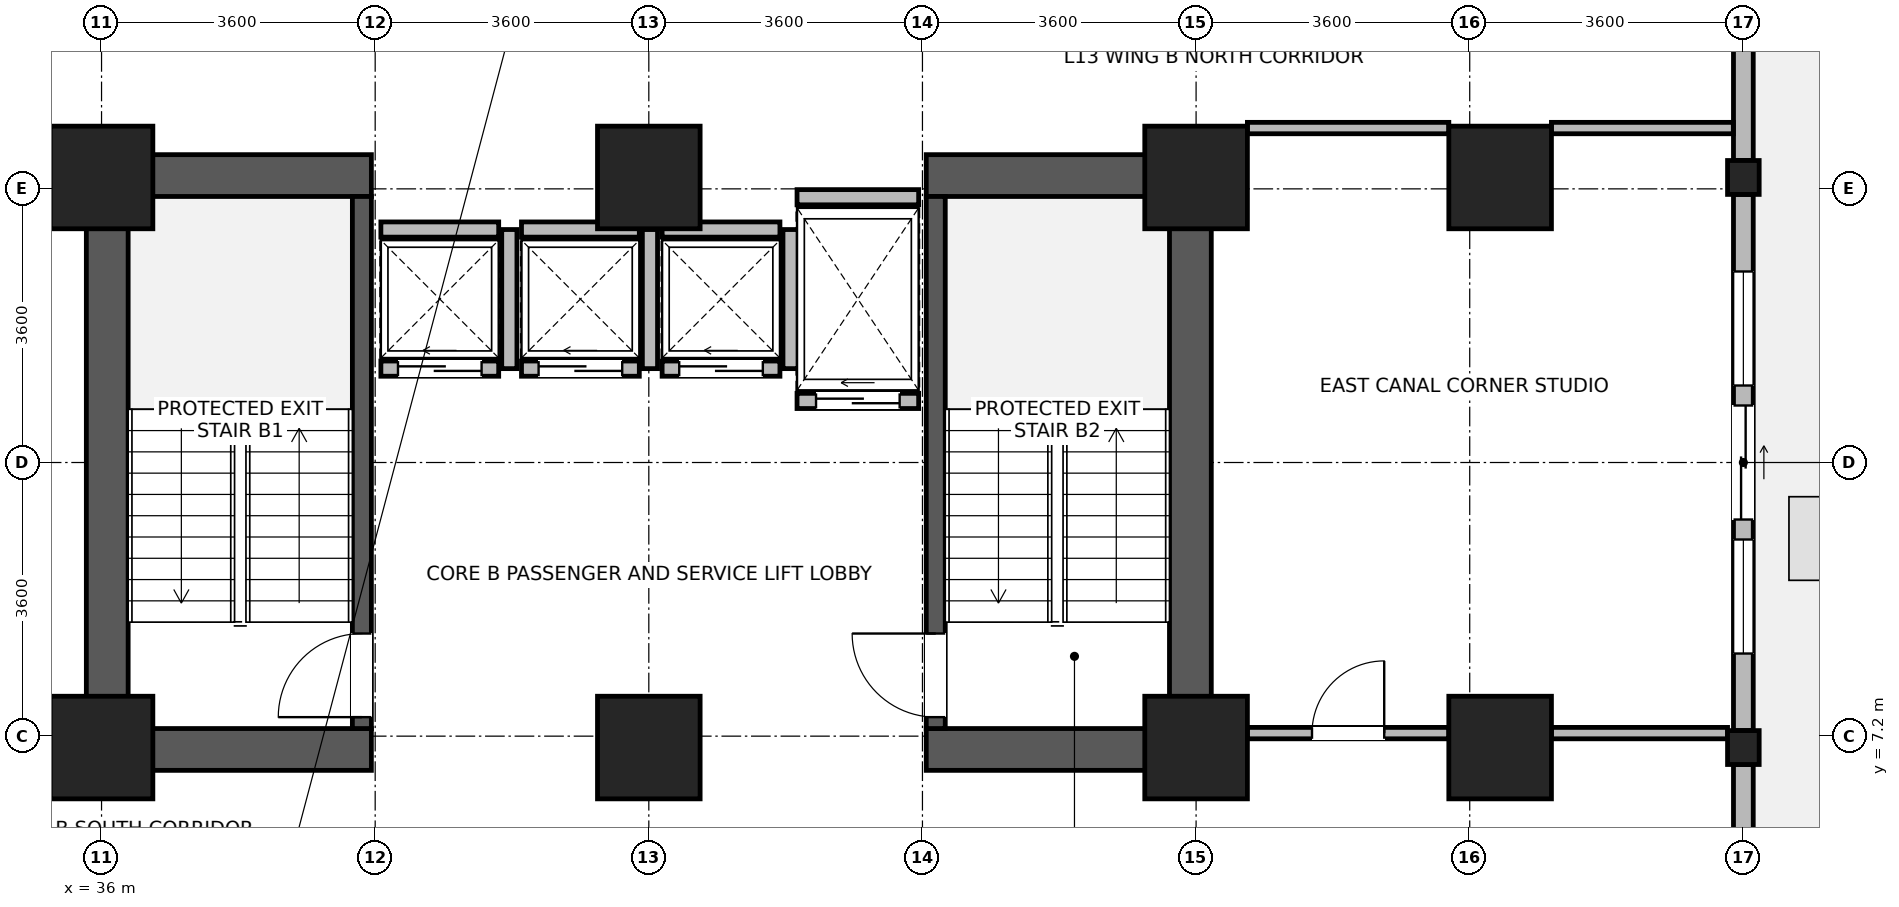
"""IFC4 building model, lengths in metres.
Left out: names, types, materials, properties, quantities, classifications, styles, units other than length and angle.
Written with IfcOpenShell. Run it as: python <this file> out.ifc"""

import sys

from ifc_helpers import new_model, si_unit, direction, frame, frame_2d, origin, origin_2d, place, context, subcontext, project, spatial, rectangle, i_section, extrude, source, transform, mapped, element, fill, save


model = new_model("IFC4")
c1 = context("Model", 3, precision=1e-05, world=origin(), true_north=direction((0.0, 1.0)))
c2 = subcontext(c1, "Body", "Model", "MODEL_VIEW")
j1 = project(units=[si_unit("LENGTHUNIT", "METRE"), si_unit("PLANEANGLEUNIT", "RADIAN")], contexts=[c1])
p1 = place(None, origin())
s1 = spatial("IfcSite", under=j1, at=p1, CompositionType="ELEMENT")
p2 = place(p1, origin())
s2 = spatial("IfcBuilding", under=s1, at=p2, CompositionType="ELEMENT")
p3 = place(p2, frame((0.0, 0.0, 54.9)))
s3 = spatial("IfcBuildingStorey", under=s2, at=p3, CompositionType="ELEMENT", Elevation=54.9)
for number, where, z_axis, x_axis in (
    (1, (36.075, 6.75, 0.0), (0.0, 0.0, 1.0), (0.0, 1.0, 0.0)),
    (2, (50.325, 6.75, 0.0), (0.0, 0.0, 1.0), (0.0, 1.0, 0.0)),
):
    element("IfcWall", number, at=place(p3, frame(where, z_axis=z_axis, x_axis=x_axis)), inside=s3, PredefinedType="SHEAR", context=c2, shape_type="SweptSolid", body=[
        extrude(rectangle(XDim=8.1, YDim=0.55, at=frame_2d((4.05, 0.0))), origin(), (0.0, 0.0, 1.0), 3.45),
    ])
for number, where, z_axis, x_axis in (
    (3, (36.35, 7.025, 0.0), (0.0, 0.0, 1.0), (1.0, 0.0, 0.0)),
    (4, (46.85, 7.025, 0.0), (0.0, 0.0, 1.0), (1.0, 0.0, 0.0)),
    (5, (36.35, 14.575, 0.0), (0.0, 0.0, 1.0), (1.0, 0.0, 0.0)),
    (6, (46.85, 14.575, 0.0), (0.0, 0.0, 1.0), (1.0, 0.0, 0.0)),
):
    element("IfcWall", number, at=place(p3, frame(where, z_axis=z_axis, x_axis=x_axis)), inside=s3, PredefinedType="SHEAR", context=c2, shape_type="SweptSolid", body=[
        extrude(rectangle(XDim=3.2, YDim=0.55, at=frame_2d((1.6, 0.0))), origin(), (0.0, 0.0, 1.0), 3.45),
    ])
p4 = place(p3, frame((39.425, 7.3, 0.0), z_axis=(0.0, 0.0, 1.0), x_axis=(0.0, 1.0, 0.0)))
e7 = element("IfcWall", 7, at=p4, inside=s3, PredefinedType="SHEAR", context=c2, shape_type="SweptSolid", body=[
    extrude(rectangle(XDim=7.0, YDim=0.25, at=frame_2d((3.5, 0.0))), origin(), (0.0, 0.0, 1.0), 3.45),
])
p5 = place(p4, frame((0.15, 0.0, 0.0)))
e8 = element("IfcOpeningElement", 8, at=p5, cuts=e7, PredefinedType="OPENING", context=c2, shape_type="SweptSolid", body=[
    extrude(rectangle(XDim=1.1, YDim=2.08, at=frame_2d((0.55, 1.04))), frame((0.0, 0.135, 0.0), z_axis=(0.0, -1.0, 0.0), x_axis=(1.0, 0.0, 0.0)), (0.0, 0.0, 1.0), 0.27),
])
p6 = place(p3, frame((46.975, 7.3, 0.0), z_axis=(0.0, 0.0, 1.0), x_axis=(0.0, 1.0, 0.0)))
e9 = element("IfcWall", 9, at=p6, inside=s3, PredefinedType="SHEAR", context=c2, shape_type="SweptSolid", body=[
    extrude(rectangle(XDim=7.0, YDim=0.25, at=frame_2d((3.5, 0.0))), origin(), (0.0, 0.0, 1.0), 3.45),
])
p7 = place(p6, frame((0.15, 0.0, 0.0)))
e10 = element("IfcOpeningElement", 10, at=p7, cuts=e9, PredefinedType="OPENING", context=c2, shape_type="SweptSolid", body=[
    extrude(rectangle(XDim=1.1, YDim=2.08, at=frame_2d((0.55, 1.04))), frame((0.0, 0.135, 0.0), z_axis=(0.0, -1.0, 0.0), x_axis=(1.0, 0.0, 0.0)), (0.0, 0.0, 1.0), 0.27),
])
m1 = source(origin(), c2, "Body", "SweptSolid", [
    extrude(rectangle(XDim=1.35, YDim=1.35, at=origin_2d()), origin(), (0.0, 0.0, 1.0), 3.7),
])
for number, where, z_axis, x_axis in (
    (11, (36.0, 7.05, 0.0), (0.0, 0.0, 1.0), (1.0, 0.0, 0.0)),
    (12, (36.0, 14.55, 0.0), (0.0, 0.0, 1.0), (1.0, 0.0, 0.0)),
    (13, (43.2, 7.05, 0.0), (0.0, 0.0, 1.0), (1.0, 0.0, 0.0)),
    (14, (43.2, 14.55, 0.0), (0.0, 0.0, 1.0), (1.0, 0.0, 0.0)),
    (15, (50.4, 7.05, 0.0), (0.0, 0.0, 1.0), (1.0, 0.0, 0.0)),
    (16, (50.4, 14.55, 0.0), (0.0, 0.0, 1.0), (1.0, 0.0, 0.0)),
    (17, (54.4, 7.05, 0.0), (0.0, 0.0, 1.0), (1.0, 0.0, 0.0)),
    (18, (54.4, 14.55, 0.0), (0.0, 0.0, 1.0), (1.0, 0.0, 0.0)),
):
    element("IfcColumn", number, at=place(p3, frame(where, z_axis=z_axis, x_axis=x_axis)), inside=s3, PredefinedType="COLUMN", context=c2, shape_type="MappedRepresentation", body=[
        mapped(m1, transform((0.0, 0.0, 0.0), x_axis=(1.0, 0.0, 0.0), y_axis=(0.0, 1.0, 0.0), z_axis=(0.0, 0.0, 1.0), scale=1.0)),
    ])
m2 = source(origin(), c2, "Body", "SweptSolid", [
    extrude(i_section(OverallWidth=0.416, OverallDepth=0.446, WebThickness=0.029, FlangeThickness=0.04, FilletRadius=0.015, at=origin_2d()), origin(), (0.0, 0.0, 1.0), 3.7),
])
for number, where, z_axis, x_axis in (
    (19, (57.6, 7.05, 0.0), (0.0, 0.0, 1.0), (1.0, 0.0, 0.0)),
    (20, (57.6, 14.55, 0.0), (0.0, 0.0, 1.0), (1.0, 0.0, 0.0)),
):
    element("IfcColumn", number, at=place(p3, frame(where, z_axis=z_axis, x_axis=x_axis)), inside=s3, PredefinedType="COLUMN", context=c2, shape_type="MappedRepresentation", body=[
        mapped(m2, transform((0.0, 0.0, 0.0), x_axis=(1.0, 0.0, 0.0), y_axis=(0.0, 1.0, 0.0), z_axis=(0.0, 0.0, 1.0), scale=1.0)),
    ])
p8 = place(p3, frame((57.6, 6.826, 0.0), z_axis=(0.0, 0.0, 1.0), x_axis=(0.0, -1.0, 0.0)))
e21 = element("IfcWall", 21, at=p8, inside=s3, PredefinedType="STANDARD", context=c2, shape_type="SweptSolid", body=[
    extrude(rectangle(XDim=2.156, YDim=0.26, at=frame_2d((1.078, 0.0))), origin(), (0.0, 0.0, 1.0), 3.43),
])
p9 = place(p3, frame((57.6, 14.326, 0.0), z_axis=(0.0, 0.0, 1.0), x_axis=(0.0, -1.0, 0.0)))
e22 = element("IfcWall", 22, at=p9, inside=s3, PredefinedType="STANDARD", context=c2, shape_type="SweptSolid", body=[
    extrude(rectangle(XDim=7.052, YDim=0.26, at=frame_2d((3.526, 0.0))), origin(), (0.0, 0.0, 1.0), 2.93),
])
p10 = place(p9, frame((2.776, 0.0, 0.0)))
e23 = element("IfcOpeningElement", 23, at=p10, cuts=e22, PredefinedType="OPENING", context=c2, shape_type="SweptSolid", body=[
    extrude(rectangle(XDim=1.5, YDim=2.15, at=frame_2d((0.75, 1.075))), frame((0.0, 0.14, 0.0), z_axis=(0.0, -1.0, 0.0), x_axis=(1.0, 0.0, 0.0)), (0.0, 0.0, 1.0), 0.28),
])
p11 = place(p9, frame((1.013, 0.0, 0.85)))
e24 = element("IfcOpeningElement", 24, at=p11, cuts=e22, PredefinedType="OPENING", context=c2, shape_type="SweptSolid", body=[
    extrude(rectangle(XDim=1.5, YDim=1.85, at=frame_2d((0.75, 0.925))), frame((0.0, 0.14, 0.0), z_axis=(0.0, -1.0, 0.0), x_axis=(1.0, 0.0, 0.0)), (0.0, 0.0, 1.0), 0.28),
])
p12 = place(p9, frame((4.539, 0.0, 0.85)))
e25 = element("IfcOpeningElement", 25, at=p12, cuts=e22, PredefinedType="OPENING", context=c2, shape_type="SweptSolid", body=[
    extrude(rectangle(XDim=1.5, YDim=1.85, at=frame_2d((0.75, 0.925))), frame((0.0, 0.14, 0.0), z_axis=(0.0, -1.0, 0.0), x_axis=(1.0, 0.0, 0.0)), (0.0, 0.0, 1.0), 0.28),
])
p13 = place(p3, frame((57.6, 21.376, 0.0), z_axis=(0.0, 0.0, 1.0), x_axis=(0.0, -1.0, 0.0)))
e26 = element("IfcWall", 26, at=p13, inside=s3, PredefinedType="STANDARD", context=c2, shape_type="SweptSolid", body=[
    extrude(rectangle(XDim=6.602, YDim=0.26, at=frame_2d((3.301, 0.0))), origin(), (0.0, 0.0, 1.0), 2.93),
])
p14 = place(p13, frame((0.9, 0.0, 0.85)))
e27 = element("IfcOpeningElement", 27, at=p14, cuts=e26, PredefinedType="OPENING", context=c2, shape_type="SweptSolid", body=[
    extrude(rectangle(XDim=1.5, YDim=1.85, at=frame_2d((0.75, 0.925))), frame((0.0, 0.14, 0.0), z_axis=(0.0, -1.0, 0.0), x_axis=(1.0, 0.0, 0.0)), (0.0, 0.0, 1.0), 0.28),
])
p15 = place(p13, frame((2.826, 0.0, 0.85)))
e28 = element("IfcOpeningElement", 28, at=p15, cuts=e26, PredefinedType="OPENING", context=c2, shape_type="SweptSolid", body=[
    extrude(rectangle(XDim=0.95, YDim=1.75, at=frame_2d((0.475, 0.875))), frame((0.0, 0.14, 0.0), z_axis=(0.0, -1.0, 0.0), x_axis=(1.0, 0.0, 0.0)), (0.0, 0.0, 1.0), 0.28),
])
p16 = place(p3, frame((39.675, 12.035, 0.0), z_axis=(0.0, 0.0, 1.0), x_axis=(1.0, 0.0, 0.0)))
e29 = element("IfcWall", 29, at=p16, inside=s3, PredefinedType="PARTITIONING", context=c2, shape_type="SweptSolid", body=[
    extrude(rectangle(XDim=1.55, YDim=0.2, at=frame_2d((0.775, 0.0))), origin(), (0.0, 0.0, 1.0), 3.43),
])
p17 = place(p16, frame((0.225, 0.0, 0.0)))
e30 = element("IfcOpeningElement", 30, at=p17, cuts=e29, PredefinedType="OPENING", context=c2, shape_type="SweptSolid", body=[
    extrude(rectangle(XDim=1.1, YDim=2.12, at=frame_2d((0.55, 1.06))), frame((0.0, 0.11, 0.0), z_axis=(0.0, -1.0, 0.0), x_axis=(1.0, 0.0, 0.0)), (0.0, 0.0, 1.0), 0.22),
])
p18 = place(p3, frame((39.675, 13.865, 0.0), z_axis=(0.0, 0.0, 1.0), x_axis=(1.0, 0.0, 0.0)))
e31 = element("IfcWall", 31, at=p18, inside=s3, PredefinedType="PARTITIONING", context=c2, shape_type="SweptSolid", body=[
    extrude(rectangle(XDim=1.55, YDim=0.2, at=frame_2d((0.775, 0.0))), origin(), (0.0, 0.0, 1.0), 3.43),
])
p19 = place(p3, frame((41.365, 12.035, 0.0), z_axis=(0.0, 0.0, 1.0), x_axis=(0.0, 1.0, 0.0)))
e32 = element("IfcWall", 32, at=p19, inside=s3, PredefinedType="PARTITIONING", context=c2, shape_type="SweptSolid", body=[
    extrude(rectangle(XDim=1.83, YDim=0.2, at=frame_2d((0.915, 0.0))), origin(), (0.0, 0.0, 1.0), 3.43),
])
p20 = place(p3, frame((41.525, 12.035, 0.0), z_axis=(0.0, 0.0, 1.0), x_axis=(1.0, 0.0, 0.0)))
e33 = element("IfcWall", 33, at=p20, inside=s3, PredefinedType="PARTITIONING", context=c2, shape_type="SweptSolid", body=[
    extrude(rectangle(XDim=1.55, YDim=0.2, at=frame_2d((0.775, 0.0))), origin(), (0.0, 0.0, 1.0), 3.43),
])
p21 = place(p20, frame((0.225, 0.0, 0.0)))
e34 = element("IfcOpeningElement", 34, at=p21, cuts=e33, PredefinedType="OPENING", context=c2, shape_type="SweptSolid", body=[
    extrude(rectangle(XDim=1.1, YDim=2.12, at=frame_2d((0.55, 1.06))), frame((0.0, 0.11, 0.0), z_axis=(0.0, -1.0, 0.0), x_axis=(1.0, 0.0, 0.0)), (0.0, 0.0, 1.0), 0.22),
])
p22 = place(p3, frame((41.525, 13.865, 0.0), z_axis=(0.0, 0.0, 1.0), x_axis=(1.0, 0.0, 0.0)))
e35 = element("IfcWall", 35, at=p22, inside=s3, PredefinedType="PARTITIONING", context=c2, shape_type="SweptSolid", body=[
    extrude(rectangle(XDim=1.55, YDim=0.2, at=frame_2d((0.775, 0.0))), origin(), (0.0, 0.0, 1.0), 3.43),
])
p23 = place(p3, frame((43.215, 12.035, 0.0), z_axis=(0.0, 0.0, 1.0), x_axis=(0.0, 1.0, 0.0)))
e36 = element("IfcWall", 36, at=p23, inside=s3, PredefinedType="PARTITIONING", context=c2, shape_type="SweptSolid", body=[
    extrude(rectangle(XDim=1.83, YDim=0.2, at=frame_2d((0.915, 0.0))), origin(), (0.0, 0.0, 1.0), 3.43),
])
p24 = place(p3, frame((43.375, 12.035, 0.0), z_axis=(0.0, 0.0, 1.0), x_axis=(1.0, 0.0, 0.0)))
e37 = element("IfcWall", 37, at=p24, inside=s3, PredefinedType="PARTITIONING", context=c2, shape_type="SweptSolid", body=[
    extrude(rectangle(XDim=1.55, YDim=0.2, at=frame_2d((0.775, 0.0))), origin(), (0.0, 0.0, 1.0), 3.43),
])
p25 = place(p24, frame((0.225, 0.0, 0.0)))
e38 = element("IfcOpeningElement", 38, at=p25, cuts=e37, PredefinedType="OPENING", context=c2, shape_type="SweptSolid", body=[
    extrude(rectangle(XDim=1.1, YDim=2.12, at=frame_2d((0.55, 1.06))), frame((0.0, 0.11, 0.0), z_axis=(0.0, -1.0, 0.0), x_axis=(1.0, 0.0, 0.0)), (0.0, 0.0, 1.0), 0.22),
])
p26 = place(p3, frame((43.375, 13.865, 0.0), z_axis=(0.0, 0.0, 1.0), x_axis=(1.0, 0.0, 0.0)))
e39 = element("IfcWall", 39, at=p26, inside=s3, PredefinedType="PARTITIONING", context=c2, shape_type="SweptSolid", body=[
    extrude(rectangle(XDim=1.55, YDim=0.2, at=frame_2d((0.775, 0.0))), origin(), (0.0, 0.0, 1.0), 3.43),
])
p27 = place(p3, frame((45.065, 12.035, 0.0), z_axis=(0.0, 0.0, 1.0), x_axis=(0.0, 1.0, 0.0)))
e40 = element("IfcWall", 40, at=p27, inside=s3, PredefinedType="PARTITIONING", context=c2, shape_type="SweptSolid", body=[
    extrude(rectangle(XDim=1.83, YDim=0.2, at=frame_2d((0.915, 0.0))), origin(), (0.0, 0.0, 1.0), 3.43),
])
p28 = place(p3, frame((45.15, 11.61, 0.0), z_axis=(0.0, 0.0, 1.0), x_axis=(1.0, 0.0, 0.0)))
e41 = element("IfcWall", 41, at=p28, inside=s3, PredefinedType="PARTITIONING", context=c2, shape_type="SweptSolid", body=[
    extrude(rectangle(XDim=1.6, YDim=0.2, at=frame_2d((0.8, 0.0))), origin(), (0.0, 0.0, 1.0), 3.43),
])
p29 = place(p28, frame((0.25, 0.0, 0.0)))
e42 = element("IfcOpeningElement", 42, at=p29, cuts=e41, PredefinedType="OPENING", context=c2, shape_type="SweptSolid", body=[
    extrude(rectangle(XDim=1.1, YDim=2.12, at=frame_2d((0.55, 1.06))), frame((0.0, 0.11, 0.0), z_axis=(0.0, -1.0, 0.0), x_axis=(1.0, 0.0, 0.0)), (0.0, 0.0, 1.0), 0.22),
])
p30 = place(p3, frame((45.15, 14.29, 0.0), z_axis=(0.0, 0.0, 1.0), x_axis=(1.0, 0.0, 0.0)))
e43 = element("IfcWall", 43, at=p30, inside=s3, PredefinedType="PARTITIONING", context=c2, shape_type="SweptSolid", body=[
    extrude(rectangle(XDim=1.6, YDim=0.2, at=frame_2d((0.8, 0.0))), origin(), (0.0, 0.0, 1.0), 2.23),
])
p31 = place(p3, frame((51.075, 7.24, 0.0), z_axis=(0.0, 0.0, 1.0), x_axis=(1.0, 0.0, 0.0)))
e44 = element("IfcWall", 44, at=p31, inside=s3, PredefinedType="PARTITIONING", context=c2, shape_type="SweptSolid", body=[
    extrude(rectangle(XDim=2.65, YDim=0.15, at=frame_2d((1.325, 0.0))), origin(), (0.0, 0.0, 1.0), 2.78),
])
p32 = place(p31, frame((0.85, 0.0, 0.0)))
e45 = element("IfcOpeningElement", 45, at=p32, cuts=e44, PredefinedType="OPENING", context=c2, shape_type="SweptSolid", body=[
    extrude(rectangle(XDim=0.95, YDim=2.1, at=frame_2d((0.475, 1.05))), frame((0.0, 0.085, 0.0), z_axis=(0.0, -1.0, 0.0), x_axis=(1.0, 0.0, 0.0)), (0.0, 0.0, 1.0), 0.17),
])
p33 = place(p3, frame((55.075, 7.24, 0.0), z_axis=(0.0, 0.0, 1.0), x_axis=(1.0, 0.0, 0.0)))
e46 = element("IfcWall", 46, at=p33, inside=s3, PredefinedType="PARTITIONING", context=c2, shape_type="SweptSolid", body=[
    extrude(rectangle(XDim=2.317, YDim=0.15, at=frame_2d((1.159, 0.0))), origin(), (0.0, 0.0, 1.0), 2.78),
])
p34 = place(p3, frame((51.075, 15.2, 0.0), z_axis=(0.0, 0.0, 1.0), x_axis=(1.0, 0.0, 0.0)))
e47 = element("IfcWall", 47, at=p34, inside=s3, PredefinedType="PARTITIONING", context=c2, shape_type="SweptSolid", body=[
    extrude(rectangle(XDim=2.65, YDim=0.15, at=frame_2d((1.325, 0.0))), origin(), (0.0, 0.0, 1.0), 3.43),
])
p35 = place(p3, frame((55.075, 15.2, 0.0), z_axis=(0.0, 0.0, 1.0), x_axis=(1.0, 0.0, 0.0)))
e48 = element("IfcWall", 48, at=p35, inside=s3, PredefinedType="PARTITIONING", context=c2, shape_type="SweptSolid", body=[
    extrude(rectangle(XDim=2.393, YDim=0.15, at=frame_2d((1.197, 0.0))), origin(), (0.0, 0.0, 1.0), 3.43),
])
p36 = place(p10, origin())
e49 = element("IfcDoor", 49, at=p36, inside=s3, OperationType="SLIDING_TO_LEFT", PredefinedType="DOOR", context=c2, shape_type="SweptSolid", body=[
    extrude(rectangle(XDim=1.5, YDim=2.15, at=frame_2d((0.75, 1.075))), frame((0.0, 0.025, 0.0), z_axis=(0.0, -1.0, 0.0), x_axis=(1.0, 0.0, 0.0)), (0.0, 0.0, 1.0), 0.05),
])
fill(e23, e49)
p37 = place(p11, origin())
e50 = element("IfcWindow", 50, at=p37, inside=s3, PartitioningType="SINGLE_PANEL", PredefinedType="WINDOW", context=c2, shape_type="SweptSolid", body=[
    extrude(rectangle(XDim=1.5, YDim=1.85, at=frame_2d((0.75, 0.925))), frame((0.0, 0.03, 0.0), z_axis=(0.0, -1.0, 0.0), x_axis=(1.0, 0.0, 0.0)), (0.0, 0.0, 1.0), 0.06),
])
fill(e24, e50)
p38 = place(p12, origin())
e51 = element("IfcWindow", 51, at=p38, inside=s3, PartitioningType="SINGLE_PANEL", PredefinedType="WINDOW", context=c2, shape_type="SweptSolid", body=[
    extrude(rectangle(XDim=1.5, YDim=1.85, at=frame_2d((0.75, 0.925))), frame((0.0, 0.03, 0.0), z_axis=(0.0, -1.0, 0.0), x_axis=(1.0, 0.0, 0.0)), (0.0, 0.0, 1.0), 0.06),
])
fill(e25, e51)
p39 = place(p5, origin())
e52 = element("IfcDoor", 52, at=p39, inside=s3, OperationType="SINGLE_SWING_LEFT", PredefinedType="DOOR", context=c2, shape_type="SweptSolid", body=[
    extrude(rectangle(XDim=1.1, YDim=2.08, at=frame_2d((0.55, 1.04))), frame((0.0, 0.025, 0.0), z_axis=(0.0, -1.0, 0.0), x_axis=(1.0, 0.0, 0.0)), (0.0, 0.0, 1.0), 0.05),
])
fill(e8, e52)
p40 = place(p7, origin())
e53 = element("IfcDoor", 53, at=p40, inside=s3, OperationType="SINGLE_SWING_RIGHT", PredefinedType="DOOR", context=c2, shape_type="SweptSolid", body=[
    extrude(rectangle(XDim=1.1, YDim=2.08, at=frame_2d((0.55, 1.04))), frame((0.0, 0.025, 0.0), z_axis=(0.0, -1.0, 0.0), x_axis=(1.0, 0.0, 0.0)), (0.0, 0.0, 1.0), 0.05),
])
fill(e10, e53)
p41 = place(p17, origin())
e54 = element("IfcDoor", 54, at=p41, inside=s3, OperationType="SLIDING_TO_LEFT", PredefinedType="DOOR", context=c2, shape_type="SweptSolid", body=[
    extrude(rectangle(XDim=1.1, YDim=2.12, at=frame_2d((0.55, 1.06))), frame((0.0, 0.025, 0.0), z_axis=(0.0, -1.0, 0.0), x_axis=(1.0, 0.0, 0.0)), (0.0, 0.0, 1.0), 0.05),
])
fill(e30, e54)
p42 = place(p21, origin())
e55 = element("IfcDoor", 55, at=p42, inside=s3, OperationType="SLIDING_TO_LEFT", PredefinedType="DOOR", context=c2, shape_type="SweptSolid", body=[
    extrude(rectangle(XDim=1.1, YDim=2.12, at=frame_2d((0.55, 1.06))), frame((0.0, 0.025, 0.0), z_axis=(0.0, -1.0, 0.0), x_axis=(1.0, 0.0, 0.0)), (0.0, 0.0, 1.0), 0.05),
])
fill(e34, e55)
p43 = place(p25, origin())
e56 = element("IfcDoor", 56, at=p43, inside=s3, OperationType="SLIDING_TO_LEFT", PredefinedType="DOOR", context=c2, shape_type="SweptSolid", body=[
    extrude(rectangle(XDim=1.1, YDim=2.12, at=frame_2d((0.55, 1.06))), frame((0.0, 0.025, 0.0), z_axis=(0.0, -1.0, 0.0), x_axis=(1.0, 0.0, 0.0)), (0.0, 0.0, 1.0), 0.05),
])
fill(e38, e56)
p44 = place(p29, origin())
e57 = element("IfcDoor", 57, at=p44, inside=s3, OperationType="SLIDING_TO_LEFT", PredefinedType="DOOR", context=c2, shape_type="SweptSolid", body=[
    extrude(rectangle(XDim=1.1, YDim=2.12, at=frame_2d((0.55, 1.06))), frame((0.0, 0.025, 0.0), z_axis=(0.0, -1.0, 0.0), x_axis=(1.0, 0.0, 0.0)), (0.0, 0.0, 1.0), 0.05),
])
fill(e42, e57)
p45 = place(p32, origin())
e58 = element("IfcDoor", 58, at=p45, inside=s3, OperationType="SINGLE_SWING_RIGHT", PredefinedType="DOOR", context=c2, shape_type="SweptSolid", body=[
    extrude(rectangle(XDim=0.95, YDim=2.1, at=frame_2d((0.475, 1.05))), frame((0.0, 0.025, 0.0), z_axis=(0.0, -1.0, 0.0), x_axis=(1.0, 0.0, 0.0)), (0.0, 0.0, 1.0), 0.05),
])
fill(e45, e58)
save(model, sys.argv[1])
